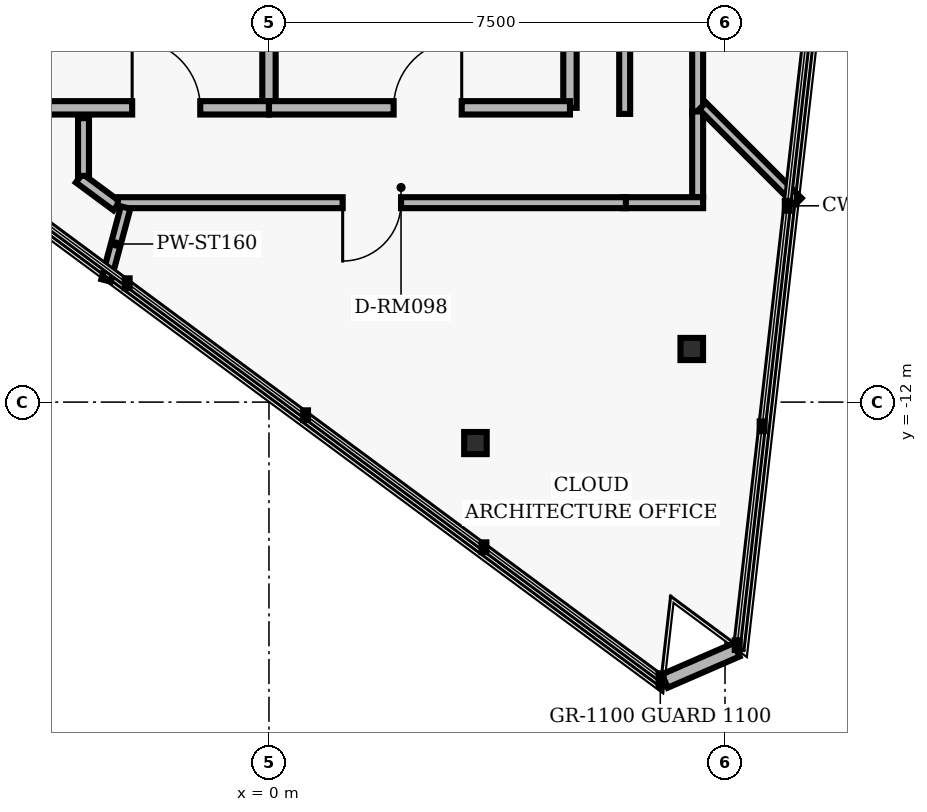
"""IFC4 building model, lengths in metres.
Left out: names, types, materials, properties, quantities, classifications, styles, units other than length and angle.
Written with IfcOpenShell. Run it as: python <this file> out.ifc"""

import sys

from ifc_helpers import new_model, si_unit, direction, frame, frame_2d, origin, origin_2d, place, context, subcontext, project, spatial, rectangle, i_section, extrude, element, fill, save


model = new_model("IFC4")
c1 = context("Model", 3, precision=1e-05, world=origin(), true_north=direction((0.0, 1.0)))
c2 = subcontext(c1, "Body", "Model", "MODEL_VIEW")
j1 = project(units=[si_unit("LENGTHUNIT", "METRE"), si_unit("PLANEANGLEUNIT", "RADIAN")], contexts=[c1])
p1 = place(None, origin())
s1 = spatial("IfcSite", under=j1, at=p1, CompositionType="ELEMENT")
p2 = place(p1, origin())
s2 = spatial("IfcBuilding", under=s1, at=p2, CompositionType="ELEMENT")
p3 = place(p2, frame((0.0, 0.0, 243.36)))
s3 = spatial("IfcBuildingStorey", under=s2, at=p3, CompositionType="ELEMENT", Elevation=243.36)
for number, where, z_axis, x_axis in (
    (1, (6.953, -11.127, 0.0), (0.0, 0.0, 1.0), (1.0, 0.0, 0.0)),
    (2, (3.396, -12.674, 0.0), (0.0, 0.0, 1.0), (1.0, 0.0, 0.0)),
):
    element("IfcColumn", number, at=place(p3, frame(where, z_axis=z_axis, x_axis=x_axis)), inside=s3, PredefinedType="COLUMN", context=c2, shape_type="SweptSolid", body=[
        extrude(i_section(OverallWidth=0.371, OverallDepth=0.364, WebThickness=0.013, FlangeThickness=0.022, FilletRadius=0.015, at=origin_2d()), origin(), (0.0, 0.0, 1.0), 2.88),
    ])
p4 = place(p3, frame((6.51, -16.588, 0.0), z_axis=(0.0, 0.0, 1.0), x_axis=(0.917064030228, 0.398739970986, 0.0)))
e3 = element("IfcWall", 3, at=p4, inside=s3, PredefinedType="PARAPET", context=c2, shape_type="SweptSolid", body=[
    extrude(rectangle(XDim=1.288, YDim=0.24, at=frame_2d((0.644, 0.0))), origin(), (0.0, 0.0, 1.0), 2.168),
])
p5 = place(p3, frame((4.95, -7.16, 0.0), z_axis=(0.0, 0.0, 1.0), x_axis=(0.0, 1.0, 0.0)))
e4 = element("IfcWall", 4, at=p5, inside=s3, PredefinedType="PARTITIONING", context=c2, shape_type="SweptSolid", body=[
    extrude(rectangle(XDim=2.71, YDim=0.22, at=frame_2d((1.355, 0.0))), origin(), (0.0, 0.0, 1.0), 2.623),
])
p6 = place(p3, frame((0.0, -7.16, 0.0), z_axis=(0.0, 0.0, 1.0), x_axis=(0.0, 1.0, 0.0)))
e5 = element("IfcWall", 5, at=p6, inside=s3, PredefinedType="PARTITIONING", context=c2, shape_type="SweptSolid", body=[
    extrude(rectangle(XDim=2.81, YDim=0.22, at=frame_2d((1.405, 0.0))), origin(), (0.0, 0.0, 1.0), 2.623),
])
p7 = place(p3, frame((-5.4, -7.16, 0.0), z_axis=(0.0, 0.0, 1.0), x_axis=(1.0, 0.0, 0.0)))
e6 = element("IfcWall", 6, at=p7, inside=s3, PredefinedType="PARTITIONING", context=c2, shape_type="SweptSolid", body=[
    extrude(rectangle(XDim=5.4, YDim=0.22, at=frame_2d((2.7, 0.0))), origin(), (0.0, 0.0, 1.0), 2.623),
])
p8 = place(p7, frame((3.15, 0.0, 0.0)))
e7 = element("IfcOpeningElement", 7, at=p8, cuts=e6, PredefinedType="OPENING", context=c2, shape_type="SweptSolid", body=[
    extrude(rectangle(XDim=1.12, YDim=2.02, at=frame_2d((0.56, 1.01))), frame((0.0, 0.12, 0.0), z_axis=(0.0, -1.0, 0.0), x_axis=(1.0, 0.0, 0.0)), (0.0, 0.0, 1.0), 0.24),
])
p9 = place(p3, frame((0.0, -7.16, 0.0), z_axis=(0.0, 0.0, 1.0), x_axis=(1.0, 0.0, 0.0)))
e8 = element("IfcWall", 8, at=p9, inside=s3, PredefinedType="PARTITIONING", context=c2, shape_type="SweptSolid", body=[
    extrude(rectangle(XDim=4.95, YDim=0.22, at=frame_2d((2.475, 0.0))), origin(), (0.0, 0.0, 1.0), 2.623),
])
p10 = place(p9, frame((2.05, 0.0, 0.0)))
e9 = element("IfcOpeningElement", 9, at=p10, cuts=e8, PredefinedType="OPENING", context=c2, shape_type="SweptSolid", body=[
    extrude(rectangle(XDim=1.12, YDim=2.02, at=frame_2d((0.56, 1.01))), frame((0.0, 0.12, 0.0), z_axis=(0.0, -1.0, 0.0), x_axis=(1.0, 0.0, 0.0)), (0.0, 0.0, 1.0), 0.24),
])
p11 = place(p3, frame((-2.503, -8.773, 0.0), z_axis=(0.0, 0.0, 1.0), x_axis=(-0.803978362095, 0.594658551845, 0.0)))
e10 = element("IfcWall", 10, at=p11, inside=s3, PredefinedType="PARTITIONING", context=c2, shape_type="SweptSolid", body=[
    extrude(rectangle(XDim=0.77, YDim=0.18, at=frame_2d((0.385, 0.0))), origin(), (0.0, 0.0, 1.0), 2.203),
])
p12 = place(p3, frame((-3.05, -8.279, 0.0), z_axis=(0.0, 0.0, 1.0), x_axis=(0.0, 1.0, 0.0)))
e11 = element("IfcWall", 11, at=p12, inside=s3, PredefinedType="PARTITIONING", context=c2, shape_type="SweptSolid", body=[
    extrude(rectangle(XDim=0.949, YDim=0.18, at=frame_2d((0.475, 0.0))), origin(), (0.0, 0.0, 1.0), 2.623),
])
p13 = place(p3, frame((5.85, -7.26, 0.0), z_axis=(0.0, 0.0, 1.0), x_axis=(0.0, 1.0, 0.0)))
e12 = element("IfcWall", 12, at=p13, inside=s3, PredefinedType="PARTITIONING", context=c2, shape_type="SweptSolid", body=[
    extrude(rectangle(XDim=2.61, YDim=0.18, at=frame_2d((1.305, 0.0))), origin(), (0.0, 0.0, 1.0), 2.153),
])
p14 = place(p3, frame((7.05, 7.22, 0.0), z_axis=(0.0, 0.0, 1.0), x_axis=(0.0, -1.0, 0.0)))
e13 = element("IfcWall", 13, at=p14, inside=s3, PredefinedType="PARTITIONING", context=c2, shape_type="SweptSolid", body=[
    extrude(rectangle(XDim=14.48, YDim=0.18, at=frame_2d((7.24, 0.0))), origin(), (0.0, 0.0, 1.0), 2.203),
])
p15 = place(p14, frame((12.019, 0.0, 0.0)))
e14 = element("IfcOpeningElement", 14, at=p15, cuts=e13, PredefinedType="OPENING", context=c2, shape_type="SweptSolid", body=[
    extrude(rectangle(XDim=1.02, YDim=2.02, at=frame_2d((0.51, 1.01))), frame((0.0, 0.1, 0.0), z_axis=(0.0, -1.0, 0.0), x_axis=(1.0, 0.0, 0.0)), (0.0, 0.0, 1.0), 0.2),
])
p16 = place(p14, frame((0.3, 0.0, 0.0)))
e15 = element("IfcOpeningElement", 15, at=p16, cuts=e13, PredefinedType="OPENING", context=c2, shape_type="SweptSolid", body=[
    extrude(rectangle(XDim=0.96, YDim=2.02, at=frame_2d((0.48, 1.01))), frame((0.0, 0.1, 0.0), z_axis=(0.0, -1.0, 0.0), x_axis=(1.0, 0.0, 0.0)), (0.0, 0.0, 1.0), 0.2),
])
p17 = place(p3, frame((7.05, -7.22, 0.0), z_axis=(0.0, 0.0, 1.0), x_axis=(0.0, -1.0, 0.0)))
e16 = element("IfcWall", 16, at=p17, inside=s3, PredefinedType="PARTITIONING", context=c2, shape_type="SweptSolid", body=[
    extrude(rectangle(XDim=1.41, YDim=0.18, at=frame_2d((0.705, 0.0))), origin(), (0.0, 0.0, 1.0), 2.153),
])
p18 = place(p3, frame((7.14, -8.72, 0.0), z_axis=(0.0, 0.0, 1.0), x_axis=(-1.0, 0.0, 0.0)))
e17 = element("IfcWall", 17, at=p18, inside=s3, PredefinedType="PARTITIONING", context=c2, shape_type="SweptSolid", body=[
    extrude(rectangle(XDim=1.31, YDim=0.18, at=frame_2d((0.655, 0.0))), origin(), (0.0, 0.0, 1.0), 2.623),
])
p19 = place(p3, frame((5.87, -8.72, 0.0), z_axis=(0.0, 0.0, 1.0), x_axis=(-1.0, 0.0, 0.0)))
e18 = element("IfcWall", 18, at=p19, inside=s3, PredefinedType="PARTITIONING", context=c2, shape_type="SweptSolid", body=[
    extrude(rectangle(XDim=8.356, YDim=0.18, at=frame_2d((4.178, 0.0))), origin(), (0.0, 0.0, 1.0), 2.623),
])
p20 = place(p19, frame((3.698, 0.0, 0.0)))
e19 = element("IfcOpeningElement", 19, at=p20, cuts=e18, PredefinedType="OPENING", context=c2, shape_type="SweptSolid", body=[
    extrude(rectangle(XDim=0.96, YDim=2.02, at=frame_2d((0.48, 1.01))), frame((0.0, 0.1, 0.0), z_axis=(0.0, -1.0, 0.0), x_axis=(1.0, 0.0, 0.0)), (0.0, 0.0, 1.0), 0.2),
])
p21 = place(p3, frame((-2.358, -8.8, 0.0), z_axis=(0.0, 0.0, 1.0), x_axis=(-0.258739361089, -0.965947174034, 0.0)))
e20 = element("IfcWall", 20, at=p21, inside=s3, PredefinedType="PARTITIONING", context=c2, shape_type="SweptSolid", body=[
    extrude(rectangle(XDim=1.242, YDim=0.16, at=frame_2d((0.621, 0.0))), origin(), (0.0, 0.0, 1.0), 2.623),
])
p22 = place(p3, frame((7.13, -7.13, 0.0), z_axis=(0.0, 0.0, 1.0), x_axis=(0.707106781187, -0.707106781187, 0.0)))
e21 = element("IfcWall", 21, at=p22, inside=s3, PredefinedType="PARTITIONING", context=c2, shape_type="SweptSolid", body=[
    extrude(rectangle(XDim=2.224, YDim=0.16, at=frame_2d((1.112, 0.0))), origin(), (0.0, 0.0, 1.0), 2.623),
])
p23 = place(p8, origin())
e22 = element("IfcDoor", 22, at=p23, inside=s3, OperationType="SINGLE_SWING_LEFT", PredefinedType="DOOR", context=c2, shape_type="SweptSolid", body=[
    extrude(rectangle(XDim=1.12, YDim=2.02, at=frame_2d((0.56, 1.01))), frame((0.0, 0.025, 0.0), z_axis=(0.0, -1.0, 0.0), x_axis=(1.0, 0.0, 0.0)), (0.0, 0.0, 1.0), 0.05),
])
fill(e7, e22)
p24 = place(p10, origin())
e23 = element("IfcDoor", 23, at=p24, inside=s3, OperationType="SINGLE_SWING_RIGHT", PredefinedType="DOOR", context=c2, shape_type="SweptSolid", body=[
    extrude(rectangle(XDim=1.12, YDim=2.02, at=frame_2d((0.56, 1.01))), frame((0.0, 0.025, 0.0), z_axis=(0.0, -1.0, 0.0), x_axis=(1.0, 0.0, 0.0)), (0.0, 0.0, 1.0), 0.05),
])
fill(e9, e23)
p25 = place(p20, origin())
e24 = element("IfcDoor", 24, at=p25, inside=s3, OperationType="SINGLE_SWING_RIGHT", PredefinedType="DOOR", context=c2, shape_type="SweptSolid", body=[
    extrude(rectangle(XDim=0.96, YDim=2.02, at=frame_2d((0.48, 1.01))), frame((0.0, 0.025, 0.0), z_axis=(0.0, -1.0, 0.0), x_axis=(1.0, 0.0, 0.0)), (0.0, 0.0, 1.0), 0.05),
])
fill(e19, e24)
save(model, sys.argv[1])
